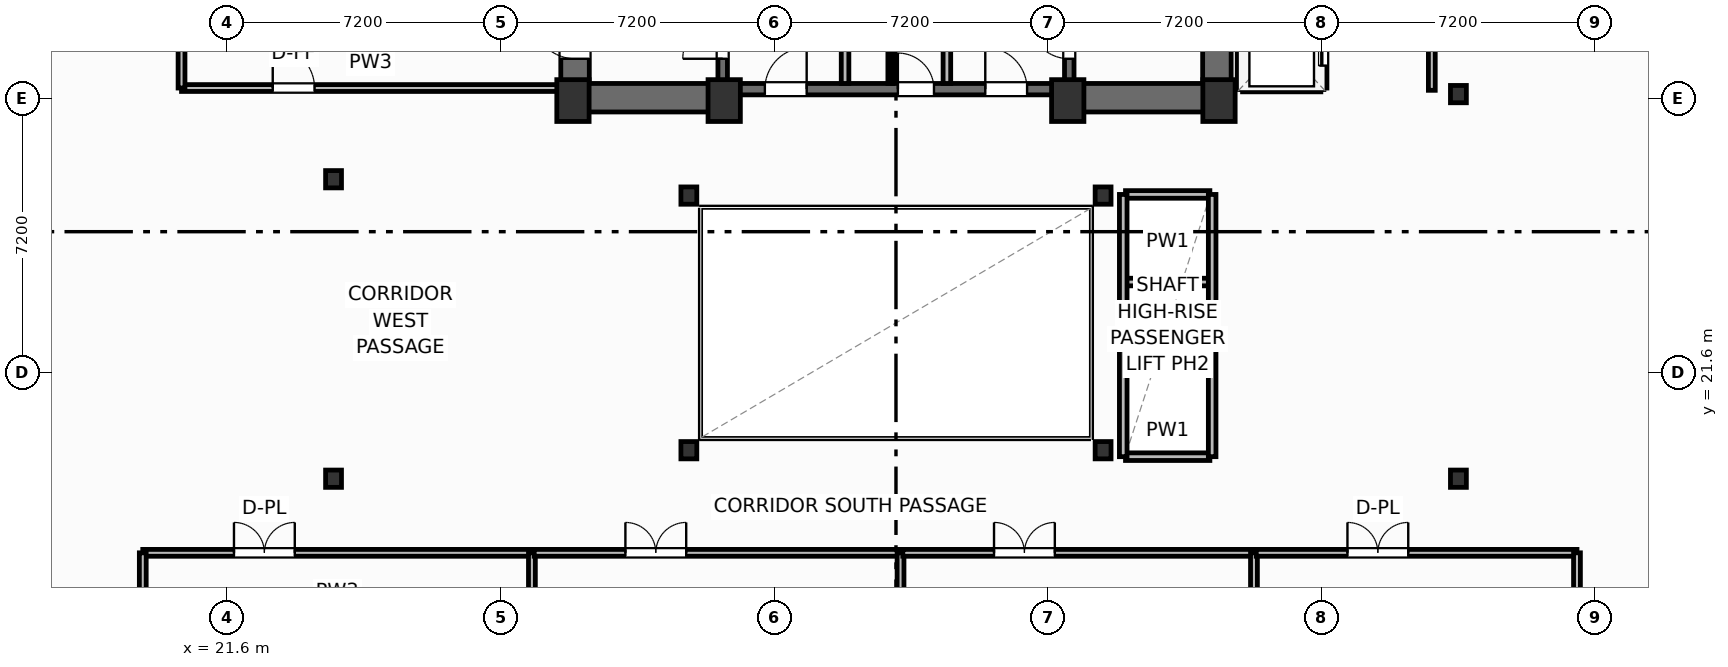
"""IFC4 building model, lengths in metres.
Left out: names, types, materials, properties, quantities, classifications, styles, units other than length and angle.
Written with IfcOpenShell. Run it as: python <this file> out.ifc"""

import sys

from ifc_helpers import new_model, si_unit, direction, frame, frame_2d, origin, origin_2d, place, context, subcontext, project, spatial, rectangle, i_section, extrude, element, fill, save


model = new_model("IFC4")
c1 = context("Model", 3, precision=1e-05, world=origin(), true_north=direction((0.0, 1.0)))
c2 = subcontext(c1, "Body", "Model", "MODEL_VIEW")
j1 = project(units=[si_unit("LENGTHUNIT", "METRE"), si_unit("PLANEANGLEUNIT", "RADIAN")], contexts=[c1])
p1 = place(None, origin())
s1 = spatial("IfcSite", under=j1, at=p1, CompositionType="ELEMENT")
p2 = place(p1, origin())
s2 = spatial("IfcBuilding", under=s1, at=p2, CompositionType="ELEMENT")
p3 = place(p2, frame((0.0, 0.0, 162.4)))
s3 = spatial("IfcBuildingStorey", under=s2, at=p3, CompositionType="ELEMENT", Elevation=162.4)
for number, where, z_axis, x_axis in (
    (1, (30.7, 28.75, 0.0), (0.0, 0.0, 1.0), (1.0, 0.0, 0.0)),
    (2, (34.68, 28.75, 0.0), (0.0, 0.0, 1.0), (1.0, 0.0, 0.0)),
    (3, (43.72, 28.75, 0.0), (0.0, 0.0, 1.0), (1.0, 0.0, 0.0)),
    (4, (47.7, 28.75, 0.0), (0.0, 0.0, 1.0), (1.0, 0.0, 0.0)),
):
    element("IfcColumn", number, at=place(p3, frame(where, z_axis=z_axis, x_axis=x_axis)), inside=s3, PredefinedType="COLUMN", context=c2, shape_type="SweptSolid", body=[
        extrude(rectangle(XDim=0.85, YDim=1.1, at=origin_2d()), origin(), (0.0, 0.0, 1.0), 4.8),
    ])
for number, where, z_axis, x_axis in (
    (5, (33.75, 19.55, 0.0), (0.0, 0.0, 1.0), (1.0, 0.0, 0.0)),
    (6, (44.65, 19.55, 0.0), (0.0, 0.0, 1.0), (1.0, 0.0, 0.0)),
    (7, (33.75, 26.25, 0.0), (0.0, 0.0, 1.0), (1.0, 0.0, 0.0)),
    (8, (44.65, 26.25, 0.0), (0.0, 0.0, 1.0), (1.0, 0.0, 0.0)),
    (9, (24.4, 18.8, 0.0), (0.0, 0.0, 1.0), (1.0, 0.0, 0.0)),
    (10, (24.4, 26.68, 0.0), (0.0, 0.0, 1.0), (1.0, 0.0, 0.0)),
    (11, (54.0, 18.8, 0.0), (0.0, 0.0, 1.0), (1.0, 0.0, 0.0)),
    (12, (54.0, 28.92, 0.0), (0.0, 0.0, 1.0), (1.0, 0.0, 0.0)),
):
    element("IfcColumn", number, at=place(p3, frame(where, z_axis=z_axis, x_axis=x_axis)), inside=s3, PredefinedType="COLUMN", context=c2, shape_type="SweptSolid", body=[
        extrude(i_section(OverallWidth=0.418, OverallDepth=0.455, WebThickness=0.042, FlangeThickness=0.068, FilletRadius=0.025, at=origin_2d()), origin(), (0.0, 0.0, 1.0), 4.8),
    ])
p4 = place(p3, frame((30.755, 29.2, 0.0), z_axis=(0.0, 0.0, 1.0), x_axis=(0.0, 1.0, 0.0)))
e13 = element("IfcWall", 13, at=p4, inside=s3, PredefinedType="SHEAR", context=c2, shape_type="SweptSolid", body=[
    extrude(rectangle(XDim=9.22, YDim=0.75, at=frame_2d((4.61, 0.0))), origin(), (0.0, 0.0, 1.0), 4.55),
])
p5 = place(p4, frame((0.65, 0.0, 0.0)))
e14 = element("IfcOpeningElement", 14, at=p5, cuts=e13, PredefinedType="OPENING", context=c2, shape_type="SweptSolid", body=[
    extrude(rectangle(XDim=1.1, YDim=2.15, at=frame_2d((0.55, 1.075))), frame((0.0, 0.385, 0.0), z_axis=(0.0, -1.0, 0.0), x_axis=(1.0, 0.0, 0.0)), (0.0, 0.0, 1.0), 0.77),
])
p6 = place(p3, frame((47.645, 29.2, 0.0), z_axis=(0.0, 0.0, 1.0), x_axis=(0.0, 1.0, 0.0)))
e15 = element("IfcWall", 15, at=p6, inside=s3, PredefinedType="SHEAR", context=c2, shape_type="SweptSolid", body=[
    extrude(rectangle(XDim=9.22, YDim=0.75, at=frame_2d((4.61, 0.0))), origin(), (0.0, 0.0, 1.0), 4.55),
])
p7 = place(p3, frame((30.38, 28.825, 0.0), z_axis=(0.0, 0.0, 1.0), x_axis=(1.0, 0.0, 0.0)))
e16 = element("IfcWall", 16, at=p7, inside=s3, PredefinedType="SHEAR", context=c2, shape_type="SweptSolid", body=[
    extrude(rectangle(XDim=4.42, YDim=0.75, at=frame_2d((2.21, 0.0))), origin(), (0.0, 0.0, 1.0), 4.55),
])
p8 = place(p3, frame((43.6, 28.825, 0.0), z_axis=(0.0, 0.0, 1.0), x_axis=(1.0, 0.0, 0.0)))
e17 = element("IfcWall", 17, at=p8, inside=s3, PredefinedType="SHEAR", context=c2, shape_type="SweptSolid", body=[
    extrude(rectangle(XDim=4.42, YDim=0.75, at=frame_2d((2.21, 0.0))), origin(), (0.0, 0.0, 1.0), 4.55),
])
p9 = place(p3, frame((34.8, 29.05, 0.0), z_axis=(0.0, 0.0, 1.0), x_axis=(1.0, 0.0, 0.0)))
e18 = element("IfcWall", 18, at=p9, inside=s3, PredefinedType="SHEAR", context=c2, shape_type="SweptSolid", body=[
    extrude(rectangle(XDim=8.8, YDim=0.3, at=frame_2d((4.4, 0.0))), origin(), (0.0, 0.0, 1.0), 4.55),
])
p10 = place(p9, frame((0.95, 0.0, 0.0)))
e19 = element("IfcOpeningElement", 19, at=p10, cuts=e18, PredefinedType="OPENING", context=c2, shape_type="SweptSolid", body=[
    extrude(rectangle(XDim=1.1, YDim=2.15, at=frame_2d((0.55, 1.075))), frame((0.0, 0.16, 0.0), z_axis=(0.0, -1.0, 0.0), x_axis=(1.0, 0.0, 0.0)), (0.0, 0.0, 1.0), 0.32),
])
p11 = place(p9, frame((6.75, 0.0, 0.0)))
e20 = element("IfcOpeningElement", 20, at=p11, cuts=e18, PredefinedType="OPENING", context=c2, shape_type="SweptSolid", body=[
    extrude(rectangle(XDim=1.1, YDim=2.15, at=frame_2d((0.55, 1.075))), frame((0.0, 0.16, 0.0), z_axis=(0.0, -1.0, 0.0), x_axis=(1.0, 0.0, 0.0)), (0.0, 0.0, 1.0), 0.32),
])
p12 = place(p9, frame((4.45, 0.0, 0.0)))
e21 = element("IfcOpeningElement", 21, at=p12, cuts=e18, PredefinedType="OPENING", context=c2, shape_type="SweptSolid", body=[
    extrude(rectangle(XDim=0.95, YDim=2.15, at=frame_2d((0.475, 1.075))), frame((0.0, 0.16, 0.0), z_axis=(0.0, -1.0, 0.0), x_axis=(1.0, 0.0, 0.0)), (0.0, 0.0, 1.0), 0.32),
])
p13 = place(p3, frame((34.64, 29.2, 0.0), z_axis=(0.0, 0.0, 1.0), x_axis=(0.0, 1.0, 0.0)))
e22 = element("IfcWall", 22, at=p13, inside=s3, PredefinedType="SHEAR", context=c2, shape_type="SweptSolid", body=[
    extrude(rectangle(XDim=9.22, YDim=0.25, at=frame_2d((4.61, 0.0))), origin(), (0.0, 0.0, 1.0), 4.55),
])
p14 = place(p13, frame((0.65, 0.0, 0.0)))
e23 = element("IfcOpeningElement", 23, at=p14, cuts=e22, PredefinedType="OPENING", context=c2, shape_type="SweptSolid", body=[
    extrude(rectangle(XDim=1.05, YDim=2.15, at=frame_2d((0.525, 1.075))), frame((0.0, 0.135, 0.0), z_axis=(0.0, -1.0, 0.0), x_axis=(1.0, 0.0, 0.0)), (0.0, 0.0, 1.0), 0.27),
])
p15 = place(p3, frame((43.76, 29.2, 0.0), z_axis=(0.0, 0.0, 1.0), x_axis=(0.0, 1.0, 0.0)))
e24 = element("IfcWall", 24, at=p15, inside=s3, PredefinedType="SHEAR", context=c2, shape_type="SweptSolid", body=[
    extrude(rectangle(XDim=9.22, YDim=0.25, at=frame_2d((4.61, 0.0))), origin(), (0.0, 0.0, 1.0), 4.55),
])
p16 = place(p15, frame((0.65, 0.0, 0.0)))
e25 = element("IfcOpeningElement", 25, at=p16, cuts=e24, PredefinedType="OPENING", context=c2, shape_type="SweptSolid", body=[
    extrude(rectangle(XDim=1.05, YDim=2.15, at=frame_2d((0.525, 1.075))), frame((0.0, 0.135, 0.0), z_axis=(0.0, -1.0, 0.0), x_axis=(1.0, 0.0, 0.0)), (0.0, 0.0, 1.0), 0.27),
])
p17 = place(p3, frame((20.4, 29.08, 0.0), z_axis=(0.0, 0.0, 1.0), x_axis=(1.0, 0.0, 0.0)))
e26 = element("IfcWall", 26, at=p17, inside=s3, PredefinedType="PARTITIONING", context=c2, shape_type="SweptSolid", body=[
    extrude(rectangle(XDim=9.95, YDim=0.18, at=frame_2d((4.975, 0.0))), origin(), (0.0, 0.0, 1.0), 4.55),
])
p18 = place(p17, frame((2.4, 0.0, 0.0)))
e27 = element("IfcOpeningElement", 27, at=p18, cuts=e26, PredefinedType="OPENING", context=c2, shape_type="SweptSolid", body=[
    extrude(rectangle(XDim=1.1, YDim=2.15, at=frame_2d((0.55, 1.075))), frame((0.0, 0.1, 0.0), z_axis=(0.0, -1.0, 0.0), x_axis=(1.0, 0.0, 0.0)), (0.0, 0.0, 1.0), 0.2),
])
p19 = place(p3, frame((20.4, 29.08, 0.0), z_axis=(0.0, 0.0, 1.0), x_axis=(0.0, 1.0, 0.0)))
e28 = element("IfcWall", 28, at=p19, inside=s3, PredefinedType="PARTITIONING", context=c2, shape_type="SweptSolid", body=[
    extrude(rectangle(XDim=7.6, YDim=0.18, at=frame_2d((3.8, 0.0))), origin(), (0.0, 0.0, 1.0), 4.55),
])
p20 = place(p3, frame((19.38, 16.85, 0.0), z_axis=(0.0, 0.0, 1.0), x_axis=(1.0, 0.0, 0.0)))
e29 = element("IfcWall", 29, at=p20, inside=s3, PredefinedType="PARTITIONING", context=c2, shape_type="SweptSolid", body=[
    extrude(rectangle(XDim=10.24, YDim=0.18, at=frame_2d((5.12, 0.0))), origin(), (0.0, 0.0, 1.0), 4.55),
])
p21 = place(p20, frame((2.4, 0.0, 0.0)))
e30 = element("IfcOpeningElement", 30, at=p21, cuts=e29, PredefinedType="OPENING", context=c2, shape_type="SweptSolid", body=[
    extrude(rectangle(XDim=1.6, YDim=2.05, at=frame_2d((0.8, 1.025))), frame((0.0, 0.1, 0.0), z_axis=(0.0, -1.0, 0.0), x_axis=(1.0, 0.0, 0.0)), (0.0, 0.0, 1.0), 0.2),
])
p22 = place(p3, frame((29.62, 4.436, 0.0), z_axis=(0.0, 0.0, 1.0), x_axis=(0.0, 1.0, 0.0)))
e31 = element("IfcWall", 31, at=p22, inside=s3, PredefinedType="PARTITIONING", context=c2, shape_type="SweptSolid", body=[
    extrude(rectangle(XDim=12.415, YDim=0.18, at=frame_2d((6.207, 0.0))), origin(), (0.0, 0.0, 1.0), 4.55),
])
p23 = place(p3, frame((19.38, 3.194, 0.0), z_axis=(0.0, 0.0, 1.0), x_axis=(0.0, 1.0, 0.0)))
e32 = element("IfcWall", 32, at=p23, inside=s3, PredefinedType="PARTITIONING", context=c2, shape_type="SweptSolid", body=[
    extrude(rectangle(XDim=13.656, YDim=0.18, at=frame_2d((6.828, 0.0))), origin(), (0.0, 0.0, 1.0), 4.55),
])
p24 = place(p3, frame((29.68, 16.85, 0.0), z_axis=(0.0, 0.0, 1.0), x_axis=(1.0, 0.0, 0.0)))
e33 = element("IfcWall", 33, at=p24, inside=s3, PredefinedType="PARTITIONING", context=c2, shape_type="SweptSolid", body=[
    extrude(rectangle(XDim=9.64, YDim=0.18, at=frame_2d((4.82, 0.0))), origin(), (0.0, 0.0, 1.0), 4.55),
])
p25 = place(p24, frame((2.4, 0.0, 0.0)))
e34 = element("IfcOpeningElement", 34, at=p25, cuts=e33, PredefinedType="OPENING", context=c2, shape_type="SweptSolid", body=[
    extrude(rectangle(XDim=1.6, YDim=2.05, at=frame_2d((0.8, 1.025))), frame((0.0, 0.1, 0.0), z_axis=(0.0, -1.0, 0.0), x_axis=(1.0, 0.0, 0.0)), (0.0, 0.0, 1.0), 0.2),
])
p26 = place(p3, frame((39.32, 5.611, 0.0), z_axis=(0.0, 0.0, 1.0), x_axis=(0.0, 1.0, 0.0)))
e35 = element("IfcWall", 35, at=p26, inside=s3, PredefinedType="PARTITIONING", context=c2, shape_type="SweptSolid", body=[
    extrude(rectangle(XDim=11.239, YDim=0.18, at=frame_2d((5.619, 0.0))), origin(), (0.0, 0.0, 1.0), 4.55),
])
p27 = place(p3, frame((39.38, 16.85, 0.0), z_axis=(0.0, 0.0, 1.0), x_axis=(1.0, 0.0, 0.0)))
e36 = element("IfcWall", 36, at=p27, inside=s3, PredefinedType="PARTITIONING", context=c2, shape_type="SweptSolid", body=[
    extrude(rectangle(XDim=9.24, YDim=0.18, at=frame_2d((4.62, 0.0))), origin(), (0.0, 0.0, 1.0), 4.55),
])
p28 = place(p27, frame((2.4, 0.0, 0.0)))
e37 = element("IfcOpeningElement", 37, at=p28, cuts=e36, PredefinedType="OPENING", context=c2, shape_type="SweptSolid", body=[
    extrude(rectangle(XDim=1.6, YDim=2.05, at=frame_2d((0.8, 1.025))), frame((0.0, 0.1, 0.0), z_axis=(0.0, -1.0, 0.0), x_axis=(1.0, 0.0, 0.0)), (0.0, 0.0, 1.0), 0.2),
])
p29 = place(p3, frame((48.62, 6.739, 0.0), z_axis=(0.0, 0.0, 1.0), x_axis=(0.0, 1.0, 0.0)))
e38 = element("IfcWall", 38, at=p29, inside=s3, PredefinedType="PARTITIONING", context=c2, shape_type="SweptSolid", body=[
    extrude(rectangle(XDim=10.111, YDim=0.18, at=frame_2d((5.056, 0.0))), origin(), (0.0, 0.0, 1.0), 4.55),
])
p30 = place(p3, frame((48.68, 16.85, 0.0), z_axis=(0.0, 0.0, 1.0), x_axis=(1.0, 0.0, 0.0)))
e39 = element("IfcWall", 39, at=p30, inside=s3, PredefinedType="PARTITIONING", context=c2, shape_type="SweptSolid", body=[
    extrude(rectangle(XDim=8.44, YDim=0.18, at=frame_2d((4.22, 0.0))), origin(), (0.0, 0.0, 1.0), 4.55),
])
p31 = place(p30, frame((2.4, 0.0, 0.0)))
e40 = element("IfcOpeningElement", 40, at=p31, cuts=e39, PredefinedType="OPENING", context=c2, shape_type="SweptSolid", body=[
    extrude(rectangle(XDim=1.6, YDim=2.05, at=frame_2d((0.8, 1.025))), frame((0.0, 0.1, 0.0), z_axis=(0.0, -1.0, 0.0), x_axis=(1.0, 0.0, 0.0)), (0.0, 0.0, 1.0), 0.2),
])
p32 = place(p3, frame((57.12, 7.769, 0.0), z_axis=(0.0, 0.0, 1.0), x_axis=(0.0, 1.0, 0.0)))
e41 = element("IfcWall", 41, at=p32, inside=s3, PredefinedType="PARTITIONING", context=c2, shape_type="SweptSolid", body=[
    extrude(rectangle(XDim=9.081, YDim=0.18, at=frame_2d((4.541, 0.0))), origin(), (0.0, 0.0, 1.0), 4.55),
])
p33 = place(p3, frame((53.3, 29.02, 0.0), z_axis=(0.0, 0.0, 1.0), x_axis=(0.0, 1.0, 0.0)))
e42 = element("IfcWall", 42, at=p33, inside=s3, PredefinedType="PARTITIONING", context=c2, shape_type="SweptSolid", body=[
    extrude(rectangle(XDim=10.28, YDim=0.18, at=frame_2d((5.14, 0.0))), origin(), (0.0, 0.0, 1.0), 4.55),
])
for number, where, z_axis, x_axis in (
    (43, (37.86, 29.2, 0.0), (0.0, 0.0, 1.0), (0.0, 1.0, 0.0)),
    (44, (40.54, 29.2, 0.0), (0.0, 0.0, 1.0), (0.0, 1.0, 0.0)),
):
    element("IfcWall", number, at=place(p3, frame(where, z_axis=z_axis, x_axis=x_axis)), inside=s3, PredefinedType="PARTITIONING", context=c2, shape_type="SweptSolid", body=[
        extrude(rectangle(XDim=5.18, YDim=0.2, at=frame_2d((2.59, 0.0))), origin(), (0.0, 0.0, 1.0), 4.55),
    ])
p34 = place(p3, frame((39.05, 29.2, 0.0), z_axis=(0.0, 0.0, 1.0), x_axis=(0.0, 1.0, 0.0)))
e45 = element("IfcWall", 45, at=p34, inside=s3, PredefinedType="PARTITIONING", context=c2, shape_type="SweptSolid", body=[
    extrude(rectangle(XDim=5.22, YDim=0.125, at=frame_2d((2.61, 0.0))), origin(), (0.0, 0.0, 1.0), 4.55),
])
p35 = place(p34, frame((2.05, 0.0, 0.0)))
e46 = element("IfcOpeningElement", 46, at=p35, cuts=e45, PredefinedType="OPENING", context=c2, shape_type="SweptSolid", body=[
    extrude(rectangle(XDim=0.85, YDim=2.05, at=frame_2d((0.425, 1.025))), frame((0.0, 0.073, 0.0), z_axis=(0.0, -1.0, 0.0), x_axis=(1.0, 0.0, 0.0)), (0.0, 0.0, 1.0), 0.145),
])
p36 = place(p3, frame((48.32, 29.08, 0.0), z_axis=(0.0, 0.0, 1.0), x_axis=(1.0, 0.0, 0.0)))
e47 = element("IfcWall", 47, at=p36, inside=s3, PredefinedType="PARTITIONING", context=c2, shape_type="SweptSolid", body=[
    extrude(rectangle(XDim=2.06, YDim=0.2, at=frame_2d((1.03, 0.0))), origin(), (0.0, 0.0, 1.0), 3.762),
])
p37 = place(p3, frame((48.28, 29.08, 0.0), z_axis=(0.0, 0.0, 1.0), x_axis=(0.0, 1.0, 0.0)))
e48 = element("IfcWall", 48, at=p37, inside=s3, PredefinedType="PARTITIONING", context=c2, shape_type="SweptSolid", body=[
    extrude(rectangle(XDim=6.89, YDim=0.2, at=frame_2d((3.445, 0.0))), origin(), (0.0, 0.0, 1.0), 4.55),
])
p38 = place(p3, frame((50.44, 29.08, 0.0), z_axis=(0.0, 0.0, 1.0), x_axis=(0.0, 1.0, 0.0)))
e49 = element("IfcWall", 49, at=p38, inside=s3, PredefinedType="PARTITIONING", context=c2, shape_type="SweptSolid", body=[
    extrude(rectangle(XDim=6.89, YDim=0.2, at=frame_2d((3.445, 0.0))), origin(), (0.0, 0.0, 1.0), 4.55),
])
p39 = place(p38, frame((0.59, 0.0, 0.0)))
e50 = element("IfcOpeningElement", 50, at=p39, cuts=e49, PredefinedType="OPENING", context=c2, shape_type="SweptSolid", body=[
    extrude(rectangle(XDim=1.1, YDim=2.15, at=frame_2d((0.55, 1.075))), frame((0.0, 0.11, 0.0), z_axis=(0.0, -1.0, 0.0), x_axis=(1.0, 0.0, 0.0)), (0.0, 0.0, 1.0), 0.22),
])
p40 = place(p38, frame((2.89, 0.0, 0.0)))
e51 = element("IfcOpeningElement", 51, at=p40, cuts=e49, PredefinedType="OPENING", context=c2, shape_type="SweptSolid", body=[
    extrude(rectangle(XDim=1.1, YDim=2.15, at=frame_2d((0.55, 1.075))), frame((0.0, 0.11, 0.0), z_axis=(0.0, -1.0, 0.0), x_axis=(1.0, 0.0, 0.0)), (0.0, 0.0, 1.0), 0.22),
])
p41 = place(p38, frame((5.19, 0.0, 0.0)))
e52 = element("IfcOpeningElement", 52, at=p41, cuts=e49, PredefinedType="OPENING", context=c2, shape_type="SweptSolid", body=[
    extrude(rectangle(XDim=1.1, YDim=2.15, at=frame_2d((0.55, 1.075))), frame((0.0, 0.11, 0.0), z_axis=(0.0, -1.0, 0.0), x_axis=(1.0, 0.0, 0.0)), (0.0, 0.0, 1.0), 0.22),
])
for number, where, z_axis, x_axis in (
    (53, (45.24, 21.675, 0.0), (0.0, 0.0, 1.0), (1.0, 0.0, 0.0)),
    (54, (45.24, 23.975, 0.0), (0.0, 0.0, 1.0), (1.0, 0.0, 0.0)),
):
    element("IfcWall", number, at=place(p3, frame(where, z_axis=z_axis, x_axis=x_axis)), inside=s3, PredefinedType="PARTITIONING", context=c2, shape_type="SweptSolid", body=[
        extrude(rectangle(XDim=2.22, YDim=0.2, at=frame_2d((1.11, 0.0))), origin(), (0.0, 0.0, 1.0), 4.55),
    ])
p42 = place(p3, frame((45.24, 19.38, 0.0), z_axis=(0.0, 0.0, 1.0), x_axis=(1.0, 0.0, 0.0)))
e55 = element("IfcWall", 55, at=p42, inside=s3, PredefinedType="PARTITIONING", context=c2, shape_type="SweptSolid", body=[
    extrude(rectangle(XDim=2.22, YDim=0.2, at=frame_2d((1.11, 0.0))), origin(), (0.0, 0.0, 1.0), 3.762),
])
p43 = place(p3, frame((45.24, 26.28, 0.0), z_axis=(0.0, 0.0, 1.0), x_axis=(1.0, 0.0, 0.0)))
e56 = element("IfcWall", 56, at=p43, inside=s3, PredefinedType="PARTITIONING", context=c2, shape_type="SweptSolid", body=[
    extrude(rectangle(XDim=2.22, YDim=0.2, at=frame_2d((1.11, 0.0))), origin(), (0.0, 0.0, 1.0), 4.55),
])
for number, where, z_axis, x_axis in (
    (57, (45.18, 19.38, 0.0), (0.0, 0.0, 1.0), (0.0, 1.0, 0.0)),
    (58, (47.52, 19.38, 0.0), (0.0, 0.0, 1.0), (0.0, 1.0, 0.0)),
):
    element("IfcWall", number, at=place(p3, frame(where, z_axis=z_axis, x_axis=x_axis)), inside=s3, PredefinedType="PARTITIONING", context=c2, shape_type="SweptSolid", body=[
        extrude(rectangle(XDim=6.9, YDim=0.2, at=frame_2d((3.45, 0.0))), origin(), (0.0, 0.0, 1.0), 4.55),
    ])
p44 = place(p5, origin())
e59 = element("IfcDoor", 59, at=p44, inside=s3, OperationType="SINGLE_SWING_RIGHT", PredefinedType="DOOR", context=c2, shape_type="SweptSolid", body=[
    extrude(rectangle(XDim=1.1, YDim=2.15, at=frame_2d((0.55, 1.075))), frame((0.0, 0.025, 0.0), z_axis=(0.0, -1.0, 0.0), x_axis=(1.0, 0.0, 0.0)), (0.0, 0.0, 1.0), 0.05),
])
fill(e14, e59)
p45 = place(p18, origin())
e60 = element("IfcDoor", 60, at=p45, inside=s3, OperationType="SINGLE_SWING_LEFT", PredefinedType="DOOR", context=c2, shape_type="SweptSolid", body=[
    extrude(rectangle(XDim=1.1, YDim=2.15, at=frame_2d((0.55, 1.075))), frame((0.0, 0.025, 0.0), z_axis=(0.0, -1.0, 0.0), x_axis=(1.0, 0.0, 0.0)), (0.0, 0.0, 1.0), 0.05),
])
fill(e27, e60)
p46 = place(p21, origin())
e61 = element("IfcDoor", 61, at=p46, inside=s3, OperationType="DOUBLE_DOOR_SINGLE_SWING", PredefinedType="DOOR", context=c2, shape_type="SweptSolid", body=[
    extrude(rectangle(XDim=1.6, YDim=2.05, at=frame_2d((0.8, 1.025))), frame((0.0, 0.025, 0.0), z_axis=(0.0, -1.0, 0.0), x_axis=(1.0, 0.0, 0.0)), (0.0, 0.0, 1.0), 0.05),
])
fill(e30, e61)
p47 = place(p25, origin())
e62 = element("IfcDoor", 62, at=p47, inside=s3, OperationType="DOUBLE_DOOR_SINGLE_SWING", PredefinedType="DOOR", context=c2, shape_type="SweptSolid", body=[
    extrude(rectangle(XDim=1.6, YDim=2.05, at=frame_2d((0.8, 1.025))), frame((0.0, 0.025, 0.0), z_axis=(0.0, -1.0, 0.0), x_axis=(1.0, 0.0, 0.0)), (0.0, 0.0, 1.0), 0.05),
])
fill(e34, e62)
p48 = place(p28, origin())
e63 = element("IfcDoor", 63, at=p48, inside=s3, OperationType="DOUBLE_DOOR_SINGLE_SWING", PredefinedType="DOOR", context=c2, shape_type="SweptSolid", body=[
    extrude(rectangle(XDim=1.6, YDim=2.05, at=frame_2d((0.8, 1.025))), frame((0.0, 0.025, 0.0), z_axis=(0.0, -1.0, 0.0), x_axis=(1.0, 0.0, 0.0)), (0.0, 0.0, 1.0), 0.05),
])
fill(e37, e63)
p49 = place(p31, origin())
e64 = element("IfcDoor", 64, at=p49, inside=s3, OperationType="DOUBLE_DOOR_SINGLE_SWING", PredefinedType="DOOR", context=c2, shape_type="SweptSolid", body=[
    extrude(rectangle(XDim=1.6, YDim=2.05, at=frame_2d((0.8, 1.025))), frame((0.0, 0.025, 0.0), z_axis=(0.0, -1.0, 0.0), x_axis=(1.0, 0.0, 0.0)), (0.0, 0.0, 1.0), 0.05),
])
fill(e40, e64)
p50 = place(p14, origin())
e65 = element("IfcDoor", 65, at=p50, inside=s3, OperationType="SINGLE_SWING_LEFT", PredefinedType="DOOR", context=c2, shape_type="SweptSolid", body=[
    extrude(rectangle(XDim=1.05, YDim=2.15, at=frame_2d((0.525, 1.075))), frame((0.0, 0.025, 0.0), z_axis=(0.0, -1.0, 0.0), x_axis=(1.0, 0.0, 0.0)), (0.0, 0.0, 1.0), 0.05),
])
fill(e23, e65)
p51 = place(p16, origin())
e66 = element("IfcDoor", 66, at=p51, inside=s3, OperationType="SINGLE_SWING_RIGHT", PredefinedType="DOOR", context=c2, shape_type="SweptSolid", body=[
    extrude(rectangle(XDim=1.05, YDim=2.15, at=frame_2d((0.525, 1.075))), frame((0.0, 0.025, 0.0), z_axis=(0.0, -1.0, 0.0), x_axis=(1.0, 0.0, 0.0)), (0.0, 0.0, 1.0), 0.05),
])
fill(e25, e66)
p52 = place(p10, origin())
e67 = element("IfcDoor", 67, at=p52, inside=s3, OperationType="SINGLE_SWING_RIGHT", PredefinedType="DOOR", context=c2, shape_type="SweptSolid", body=[
    extrude(rectangle(XDim=1.1, YDim=2.15, at=frame_2d((0.55, 1.075))), frame((0.0, 0.025, 0.0), z_axis=(0.0, -1.0, 0.0), x_axis=(1.0, 0.0, 0.0)), (0.0, 0.0, 1.0), 0.05),
])
fill(e19, e67)
p53 = place(p11, origin())
e68 = element("IfcDoor", 68, at=p53, inside=s3, OperationType="SINGLE_SWING_LEFT", PredefinedType="DOOR", context=c2, shape_type="SweptSolid", body=[
    extrude(rectangle(XDim=1.1, YDim=2.15, at=frame_2d((0.55, 1.075))), frame((0.0, 0.025, 0.0), z_axis=(0.0, -1.0, 0.0), x_axis=(1.0, 0.0, 0.0)), (0.0, 0.0, 1.0), 0.05),
])
fill(e20, e68)
p54 = place(p12, origin())
e69 = element("IfcDoor", 69, at=p54, inside=s3, OperationType="SINGLE_SWING_LEFT", PredefinedType="DOOR", context=c2, shape_type="SweptSolid", body=[
    extrude(rectangle(XDim=0.95, YDim=2.15, at=frame_2d((0.475, 1.075))), frame((0.0, 0.025, 0.0), z_axis=(0.0, -1.0, 0.0), x_axis=(1.0, 0.0, 0.0)), (0.0, 0.0, 1.0), 0.05),
])
fill(e21, e69)
p55 = place(p39, origin())
e70 = element("IfcDoor", 70, at=p55, inside=s3, OperationType="SLIDING_TO_LEFT", PredefinedType="DOOR", context=c2, shape_type="SweptSolid", body=[
    extrude(rectangle(XDim=1.1, YDim=2.15, at=frame_2d((0.55, 1.075))), frame((0.0, 0.025, 0.0), z_axis=(0.0, -1.0, 0.0), x_axis=(1.0, 0.0, 0.0)), (0.0, 0.0, 1.0), 0.05),
])
fill(e50, e70)
save(model, sys.argv[1])
